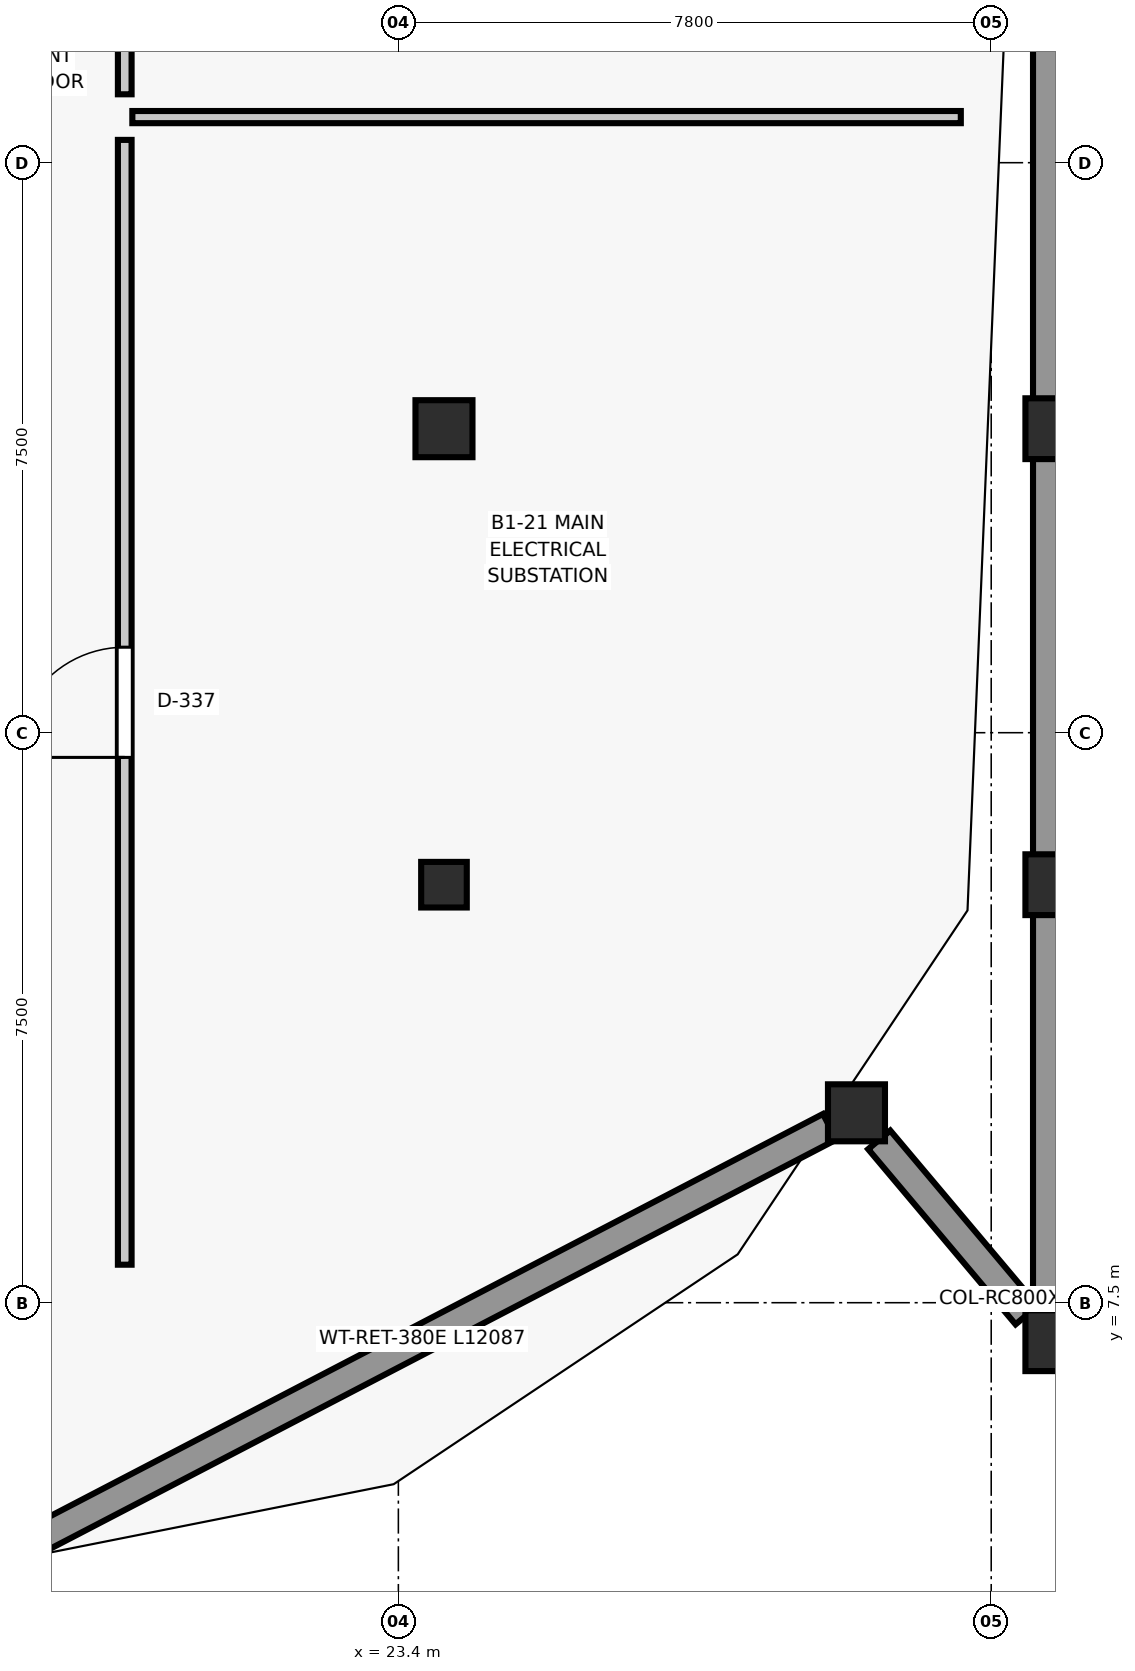
"""IFC4 building model, lengths in metres.
Left out: names, types, materials, properties, quantities, classifications, styles, units other than length and angle.
Written with IfcOpenShell. Run it as: python <this file> out.ifc"""

import sys

from ifc_helpers import new_model, si_unit, direction, frame, frame_2d, origin, origin_2d, place, context, subcontext, project, spatial, rectangle, circle, extrude, element, fill, save


model = new_model("IFC4")
c1 = context("Model", 3, precision=1e-05, world=origin(), true_north=direction((0.0, 1.0)))
c2 = subcontext(c1, "Body", "Model", "MODEL_VIEW")
j1 = project(units=[si_unit("LENGTHUNIT", "METRE"), si_unit("PLANEANGLEUNIT", "RADIAN")], contexts=[c1])
p1 = place(None, origin())
s1 = spatial("IfcSite", under=j1, at=p1, CompositionType="ELEMENT")
p2 = place(p1, origin())
s2 = spatial("IfcBuilding", under=s1, at=p2, CompositionType="ELEMENT")
p3 = place(p2, frame((0.0, 0.0, -4.2)))
s3 = spatial("IfcBuildingStorey", under=s2, at=p3, CompositionType="ELEMENT", Elevation=-4.2)
p4 = place(p3, frame((29.427, 9.999, 0.0), z_axis=(0.0, 0.0, 1.0), x_axis=(1.0, 0.0, 0.0)))
e1 = element("IfcColumn", 1, at=p4, inside=s3, PredefinedType="COLUMN", context=c2, shape_type="SweptSolid", body=[
    extrude(rectangle(XDim=0.75, YDim=0.75, at=origin_2d()), origin(), (0.0, 0.0, 1.0), 4.2),
])
p5 = place(p3, frame((24.0, 13.0, 0.0), z_axis=(0.0, 0.0, 1.0), x_axis=(1.0, 0.0, 0.0)))
e2 = element("IfcColumn", 2, at=p5, inside=s3, PredefinedType="COLUMN", context=c2, shape_type="SweptSolid", body=[
    extrude(rectangle(XDim=0.6, YDim=0.6, at=origin_2d()), origin(), (0.0, 0.0, 1.0), 4.2),
])
p6 = place(p3, frame((24.0, 19.0, 0.0), z_axis=(0.0, 0.0, 1.0), x_axis=(1.0, 0.0, 0.0)))
e3 = element("IfcColumn", 3, at=p6, inside=s3, PredefinedType="COLUMN", context=c2, shape_type="SweptSolid", body=[
    extrude(circle(Radius=0.375, at=origin_2d()), origin(), (0.0, 0.0, 1.0), 4.2),
])
for number, where, z_axis, x_axis in (
    (4, (31.95, 7.0, 0.0), (0.0, 0.0, 1.0), (1.0, 0.0, 0.0)),
    (5, (31.95, 13.0, 0.0), (0.0, 0.0, 1.0), (1.0, 0.0, 0.0)),
    (6, (31.95, 19.0, 0.0), (0.0, 0.0, 1.0), (1.0, 0.0, 0.0)),
):
    element("IfcColumn", number, at=place(p3, frame(where, z_axis=z_axis, x_axis=x_axis)), inside=s3, PredefinedType="COLUMN", context=c2, shape_type="SweptSolid", body=[
        extrude(rectangle(XDim=0.6, YDim=0.8, at=origin_2d()), origin(), (0.0, 0.0, 1.0), 4.2),
    ])
for number, where, z_axis, x_axis in (
    (7, (31.95, 12.625, 0.0), (0.0, 0.0, 1.0), (0.0, -1.0, 0.0)),
    (8, (31.95, 18.625, 0.0), (0.0, 0.0, 1.0), (0.0, -1.0, 0.0)),
    (9, (31.95, 24.625, 0.0), (0.0, 0.0, 1.0), (0.0, -1.0, 0.0)),
):
    element("IfcWall", number, at=place(p3, frame(where, z_axis=z_axis, x_axis=x_axis)), inside=s3, PredefinedType="SHEAR", context=c2, shape_type="SweptSolid", body=[
        extrude(rectangle(XDim=5.25, YDim=0.4, at=frame_2d((2.625, 0.0))), origin(), (0.0, 0.0, 1.0), 4.2),
    ])
p7 = place(p3, frame((31.666, 7.337, 0.0), z_axis=(0.0, 0.0, 1.0), x_axis=(-0.643796278673, 0.765196936459, 0.0)))
e10 = element("IfcWall", 10, at=p7, inside=s3, PredefinedType="SHEAR", context=c2, shape_type="SweptSolid", body=[
    extrude(rectangle(XDim=3.012, YDim=0.38, at=frame_2d((1.506, 0.0))), origin(), (0.0, 0.0, 1.0), 4.2),
])
p8 = place(p3, frame((29.074, 9.815, 0.0), z_axis=(0.0, 0.0, 1.0), x_axis=(-0.887012674584, -0.46174507591, 0.0)))
e11 = element("IfcWall", 11, at=p8, inside=s3, PredefinedType="SHEAR", context=c2, shape_type="SweptSolid", body=[
    extrude(rectangle(XDim=12.087, YDim=0.38, at=frame_2d((6.044, 0.0))), origin(), (0.0, 0.0, 1.0), 4.2),
])
p9 = place(p3, frame((19.8, 8.0, 0.0), z_axis=(0.0, 0.0, 1.0), x_axis=(0.0, 1.0, 0.0)))
e12 = element("IfcWall", 12, at=p9, inside=s3, PredefinedType="PARTITIONING", context=c2, shape_type="SweptSolid", body=[
    extrude(rectangle(XDim=14.8, YDim=0.18, at=frame_2d((7.4, 0.0))), origin(), (0.0, 0.0, 1.0), 3.895),
])
p10 = place(p9, frame((6.675, 0.0, 0.0)))
e13 = element("IfcOpeningElement", 13, at=p10, cuts=e12, PredefinedType="OPENING", context=c2, shape_type="SweptSolid", body=[
    extrude(rectangle(XDim=1.45, YDim=2.2, at=frame_2d((0.725, 1.1))), frame((0.0, 0.1, 0.0), z_axis=(0.0, -1.0, 0.0), x_axis=(1.0, 0.0, 0.0)), (0.0, 0.0, 1.0), 0.2),
])
p11 = place(p3, frame((19.8, 23.4, 0.0), z_axis=(0.0, 0.0, 1.0), x_axis=(0.0, 1.0, 0.0)))
e14 = element("IfcWall", 14, at=p11, inside=s3, PredefinedType="PARTITIONING", context=c2, shape_type="SweptSolid", body=[
    extrude(rectangle(XDim=16.6, YDim=0.18, at=frame_2d((8.3, 0.0))), origin(), (0.0, 0.0, 1.0), 3.895),
])
p12 = place(p11, frame((7.575, 0.0, 0.0)))
e15 = element("IfcOpeningElement", 15, at=p12, cuts=e14, PredefinedType="OPENING", context=c2, shape_type="SweptSolid", body=[
    extrude(rectangle(XDim=1.45, YDim=2.2, at=frame_2d((0.725, 1.1))), frame((0.0, 0.1, 0.0), z_axis=(0.0, -1.0, 0.0), x_axis=(1.0, 0.0, 0.0)), (0.0, 0.0, 1.0), 0.2),
])
p13 = place(p3, frame((19.9, 23.1, 0.0), z_axis=(0.0, 0.0, 1.0), x_axis=(1.0, 0.0, 0.0)))
e16 = element("IfcWall", 16, at=p13, inside=s3, PredefinedType="PARTITIONING", context=c2, shape_type="SweptSolid", body=[
    extrude(rectangle(XDim=10.9, YDim=0.16, at=frame_2d((5.45, 0.0))), origin(), (0.0, 0.0, 1.0), 3.895),
])
p14 = place(p10, origin())
e17 = element("IfcDoor", 17, at=p14, inside=s3, OperationType="SINGLE_SWING_LEFT", PredefinedType="DOOR", context=c2, shape_type="SweptSolid", body=[
    extrude(rectangle(XDim=1.45, YDim=2.2, at=frame_2d((0.725, 1.1))), frame((0.0, 0.025, 0.0), z_axis=(0.0, -1.0, 0.0), x_axis=(1.0, 0.0, 0.0)), (0.0, 0.0, 1.0), 0.05),
])
fill(e13, e17)
save(model, sys.argv[1])
